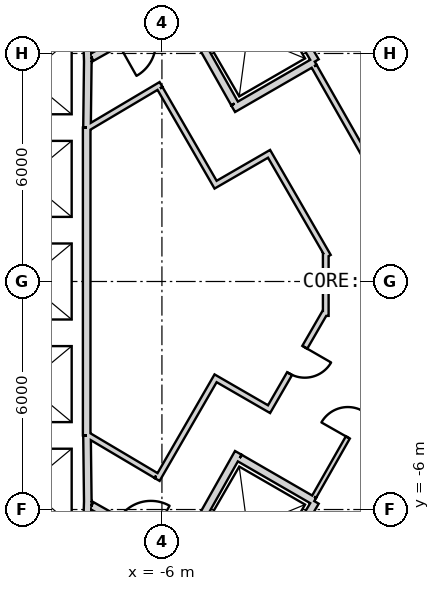
"""IFC4 building model, lengths in metres.
Left out: names, types, materials, properties, quantities, classifications, styles, units other than length and angle.
Written with IfcOpenShell. Run it as: python <this file> out.ifc"""

import sys

from ifc_helpers import new_model, si_unit, direction, frame, frame_2d, origin, place, context, subcontext, project, spatial, rectangle, extrude, element, fill, save


model = new_model("IFC4")
c1 = context("Model", 3, precision=1e-05, world=origin(), true_north=direction((0.0, 1.0)))
c2 = subcontext(c1, "Body", "Model", "MODEL_VIEW")
j1 = project(units=[si_unit("LENGTHUNIT", "METRE"), si_unit("PLANEANGLEUNIT", "RADIAN")], contexts=[c1])
p1 = place(None, origin())
s1 = spatial("IfcSite", under=j1, at=p1, CompositionType="ELEMENT")
p2 = place(p1, origin())
s2 = spatial("IfcBuilding", under=s1, at=p2, CompositionType="ELEMENT")
p3 = place(p2, frame((0.0, 0.0, 156.2)))
s3 = spatial("IfcBuildingStorey", under=s2, at=p3, CompositionType="ELEMENT", Elevation=156.2)
p4 = place(p3, frame((19.475, 2.208, 0.0), z_axis=(0.0, 0.0, 1.0), x_axis=(-0.866028369851, 0.499994862586, 0.0)))
e1 = element("IfcWall", 1, at=p4, inside=s3, PredefinedType="SHEAR", context=c2, shape_type="SweptSolid", body=[
    extrude(rectangle(XDim=31.523, YDim=0.9, at=frame_2d((15.762, 0.0))), origin(), (0.0, 0.0, 1.0), 7.0),
])
p5 = place(p4, frame((7.062, 0.0, 0.0)))
e2 = element("IfcOpeningElement", 2, at=p5, cuts=e1, PredefinedType="OPENING", context=c2, shape_type="SweptSolid", body=[
    extrude(rectangle(XDim=1.2, YDim=2.4, at=frame_2d((0.6, 1.2))), frame((0.0, 0.46, 0.0), z_axis=(0.0, -1.0, 0.0), x_axis=(1.0, 0.0, 0.0)), (0.0, 0.0, 1.0), 0.92),
])
p6 = place(p4, frame((15.162, 0.0, 0.0)))
e3 = element("IfcOpeningElement", 3, at=p6, cuts=e1, PredefinedType="OPENING", context=c2, shape_type="SweptSolid", body=[
    extrude(rectangle(XDim=1.2, YDim=2.4, at=frame_2d((0.6, 1.2))), frame((0.0, 0.46, 0.0), z_axis=(0.0, -1.0, 0.0), x_axis=(1.0, 0.0, 0.0)), (0.0, 0.0, 1.0), 0.92),
])
p7 = place(p4, frame((17.862, 0.0, 0.0)))
e4 = element("IfcOpeningElement", 4, at=p7, cuts=e1, PredefinedType="OPENING", context=c2, shape_type="SweptSolid", body=[
    extrude(rectangle(XDim=1.2, YDim=2.4, at=frame_2d((0.6, 1.2))), frame((0.0, 0.46, 0.0), z_axis=(0.0, -1.0, 0.0), x_axis=(1.0, 0.0, 0.0)), (0.0, 0.0, 1.0), 0.92),
])
p8 = place(p4, frame((20.562, 0.0, 0.0)))
e5 = element("IfcOpeningElement", 5, at=p8, cuts=e1, PredefinedType="OPENING", context=c2, shape_type="SweptSolid", body=[
    extrude(rectangle(XDim=1.2, YDim=2.4, at=frame_2d((0.6, 1.2))), frame((0.0, 0.46, 0.0), z_axis=(0.0, -1.0, 0.0), x_axis=(1.0, 0.0, 0.0)), (0.0, 0.0, 1.0), 0.92),
])
p9 = place(p4, frame((23.262, 0.0, 0.0)))
e6 = element("IfcOpeningElement", 6, at=p9, cuts=e1, PredefinedType="OPENING", context=c2, shape_type="SweptSolid", body=[
    extrude(rectangle(XDim=1.2, YDim=2.4, at=frame_2d((0.6, 1.2))), frame((0.0, 0.46, 0.0), z_axis=(0.0, -1.0, 0.0), x_axis=(1.0, 0.0, 0.0)), (0.0, 0.0, 1.0), 0.92),
])
p10 = place(p4, frame((3.612, 0.0, 0.0)))
e7 = element("IfcOpeningElement", 7, at=p10, cuts=e1, PredefinedType="OPENING", context=c2, shape_type="SweptSolid", body=[
    extrude(rectangle(XDim=1.2, YDim=2.4, at=frame_2d((0.6, 1.2))), frame((0.0, 0.46, 0.0), z_axis=(0.0, -1.0, 0.0), x_axis=(1.0, 0.0, 0.0)), (0.0, 0.0, 1.0), 0.92),
])
p11 = place(p4, frame((26.712, 0.0, 0.0)))
e8 = element("IfcOpeningElement", 8, at=p11, cuts=e1, PredefinedType="OPENING", context=c2, shape_type="SweptSolid", body=[
    extrude(rectangle(XDim=1.2, YDim=2.4, at=frame_2d((0.6, 1.2))), frame((0.0, 0.46, 0.0), z_axis=(0.0, -1.0, 0.0), x_axis=(1.0, 0.0, 0.0)), (0.0, 0.0, 1.0), 0.92),
])
p12 = place(p3, frame((-7.825, -17.97, 0.0), z_axis=(0.0, 0.0, 1.0), x_axis=(0.866028369851, 0.499994862586, 0.0)))
e9 = element("IfcWall", 9, at=p12, inside=s3, PredefinedType="SHEAR", context=c2, shape_type="SweptSolid", body=[
    extrude(rectangle(XDim=31.523, YDim=0.9, at=frame_2d((15.762, 0.0))), origin(), (0.0, 0.0, 1.0), 7.0),
])
p13 = place(p12, frame((7.062, 0.0, 0.0)))
e10 = element("IfcOpeningElement", 10, at=p13, cuts=e9, PredefinedType="OPENING", context=c2, shape_type="SweptSolid", body=[
    extrude(rectangle(XDim=1.2, YDim=2.4, at=frame_2d((0.6, 1.2))), frame((0.0, 0.46, 0.0), z_axis=(0.0, -1.0, 0.0), x_axis=(1.0, 0.0, 0.0)), (0.0, 0.0, 1.0), 0.92),
])
p14 = place(p12, frame((9.762, 0.0, 0.0)))
e11 = element("IfcOpeningElement", 11, at=p14, cuts=e9, PredefinedType="OPENING", context=c2, shape_type="SweptSolid", body=[
    extrude(rectangle(XDim=1.2, YDim=2.4, at=frame_2d((0.6, 1.2))), frame((0.0, 0.46, 0.0), z_axis=(0.0, -1.0, 0.0), x_axis=(1.0, 0.0, 0.0)), (0.0, 0.0, 1.0), 0.92),
])
p15 = place(p12, frame((12.462, 0.0, 0.0)))
e12 = element("IfcOpeningElement", 12, at=p15, cuts=e9, PredefinedType="OPENING", context=c2, shape_type="SweptSolid", body=[
    extrude(rectangle(XDim=1.2, YDim=2.4, at=frame_2d((0.6, 1.2))), frame((0.0, 0.46, 0.0), z_axis=(0.0, -1.0, 0.0), x_axis=(1.0, 0.0, 0.0)), (0.0, 0.0, 1.0), 0.92),
])
p16 = place(p12, frame((15.162, 0.0, 0.0)))
e13 = element("IfcOpeningElement", 13, at=p16, cuts=e9, PredefinedType="OPENING", context=c2, shape_type="SweptSolid", body=[
    extrude(rectangle(XDim=1.2, YDim=2.4, at=frame_2d((0.6, 1.2))), frame((0.0, 0.46, 0.0), z_axis=(0.0, -1.0, 0.0), x_axis=(1.0, 0.0, 0.0)), (0.0, 0.0, 1.0), 0.92),
])
p17 = place(p12, frame((17.862, 0.0, 0.0)))
e14 = element("IfcOpeningElement", 14, at=p17, cuts=e9, PredefinedType="OPENING", context=c2, shape_type="SweptSolid", body=[
    extrude(rectangle(XDim=1.2, YDim=2.4, at=frame_2d((0.6, 1.2))), frame((0.0, 0.46, 0.0), z_axis=(0.0, -1.0, 0.0), x_axis=(1.0, 0.0, 0.0)), (0.0, 0.0, 1.0), 0.92),
])
p18 = place(p12, frame((20.562, 0.0, 0.0)))
e15 = element("IfcOpeningElement", 15, at=p18, cuts=e9, PredefinedType="OPENING", context=c2, shape_type="SweptSolid", body=[
    extrude(rectangle(XDim=1.2, YDim=2.4, at=frame_2d((0.6, 1.2))), frame((0.0, 0.46, 0.0), z_axis=(0.0, -1.0, 0.0), x_axis=(1.0, 0.0, 0.0)), (0.0, 0.0, 1.0), 0.92),
])
p19 = place(p12, frame((26.712, 0.0, 0.0)))
e16 = element("IfcOpeningElement", 16, at=p19, cuts=e9, PredefinedType="OPENING", context=c2, shape_type="SweptSolid", body=[
    extrude(rectangle(XDim=1.2, YDim=2.4, at=frame_2d((0.6, 1.2))), frame((0.0, 0.46, 0.0), z_axis=(0.0, -1.0, 0.0), x_axis=(1.0, 0.0, 0.0)), (0.0, 0.0, 1.0), 0.92),
])
p20 = place(p12, frame((3.612, 0.0, 0.0)))
e17 = element("IfcOpeningElement", 17, at=p20, cuts=e9, PredefinedType="OPENING", context=c2, shape_type="SweptSolid", body=[
    extrude(rectangle(XDim=1.2, YDim=2.4, at=frame_2d((0.6, 1.2))), frame((0.0, 0.46, 0.0), z_axis=(0.0, -1.0, 0.0), x_axis=(1.0, 0.0, 0.0)), (0.0, 0.0, 1.0), 0.92),
])
p21 = place(p3, frame((-7.977, 6.65, 0.0), z_axis=(0.0, 0.0, 1.0), x_axis=(0.030861509705, -0.999523670164, 0.0)))
e18 = element("IfcWall", 18, at=p21, inside=s3, PredefinedType="PLUMBINGWALL", context=c2, shape_type="SweptSolid", body=[
    extrude(rectangle(XDim=0.878, YDim=0.2, at=frame_2d((0.439, 0.0))), origin(), (0.0, 0.0, 1.0), 6.65),
])
p22 = place(p3, frame((-7.949, 5.895, 0.0), z_axis=(0.0, 0.0, 1.0), x_axis=(-0.012042535896, -0.999927486035, 0.0)))
e19 = element("IfcWall", 19, at=p22, inside=s3, PredefinedType="PLUMBINGWALL", context=c2, shape_type="SweptSolid", body=[
    extrude(rectangle(XDim=1.845, YDim=0.2, at=frame_2d((0.922, 0.0))), origin(), (0.0, 0.0, 1.0), 6.65),
])
p23 = place(p3, frame((-7.98, 4.05, 0.0), z_axis=(0.0, 0.0, 1.0), x_axis=(0.0, -1.0, 0.0)))
e20 = element("IfcWall", 20, at=p23, inside=s3, PredefinedType="PLUMBINGWALL", context=c2, shape_type="SweptSolid", body=[
    extrude(rectangle(XDim=8.1, YDim=0.2, at=frame_2d((4.05, 0.0))), origin(), (0.0, 0.0, 1.0), 6.65),
])
p24 = place(p3, frame((-7.95, -5.772, 0.0), z_axis=(0.0, 0.0, 1.0), x_axis=(-0.030803413295, -0.999525462272, 0.0)))
e21 = element("IfcWall", 21, at=p24, inside=s3, PredefinedType="PLUMBINGWALL", context=c2, shape_type="SweptSolid", body=[
    extrude(rectangle(XDim=1.078, YDim=0.2, at=frame_2d((0.539, 0.0))), origin(), (0.0, 0.0, 1.0), 6.65),
])
p25 = place(p3, frame((-7.971, -4.05, 0.0), z_axis=(0.0, 0.0, 1.0), x_axis=(0.012042535896, -0.999927486035, 0.0)))
e22 = element("IfcWall", 22, at=p25, inside=s3, PredefinedType="PLUMBINGWALL", context=c2, shape_type="SweptSolid", body=[
    extrude(rectangle(XDim=1.845, YDim=0.2, at=frame_2d((0.922, 0.0))), origin(), (0.0, 0.0, 1.0), 6.65),
])
p26 = place(p3, frame((-3.538, 8.465, 0.0), z_axis=(0.0, 0.0, 1.0), x_axis=(0.508647062354, -0.860975125052, 0.0)))
e23 = element("IfcWall", 23, at=p26, inside=s3, PredefinedType="PLUMBINGWALL", context=c2, shape_type="SweptSolid", body=[
    extrude(rectangle(XDim=3.1, YDim=0.2, at=frame_2d((1.55, 0.0))), origin(), (0.0, 0.0, 1.0), 6.65),
])
p27 = place(p3, frame((-1.979, 5.786, 0.0), z_axis=(0.0, 0.0, 1.0), x_axis=(-0.866016689309, -0.500015093611, 0.0)))
e24 = element("IfcWall", 24, at=p27, inside=s3, PredefinedType="PLUMBINGWALL", context=c2, shape_type="SweptSolid", body=[
    extrude(rectangle(XDim=2.479, YDim=0.2, at=frame_2d((1.24, 0.0))), origin(), (0.0, 0.0, 1.0), 6.65),
])
p28 = place(p3, frame((-5.562, 7.296, 0.0), z_axis=(0.0, 0.0, 1.0), x_axis=(0.49134651263, -0.870964180966, 0.0)))
e25 = element("IfcWall", 25, at=p28, inside=s3, PredefinedType="PLUMBINGWALL", context=c2, shape_type="SweptSolid", body=[
    extrude(rectangle(XDim=3.0, YDim=0.2, at=frame_2d((1.5, 0.0))), origin(), (0.0, 0.0, 1.0), 6.65),
])
p29 = place(p3, frame((-1.961, -5.796, 0.0), z_axis=(0.0, 0.0, 1.0), x_axis=(-0.508647062354, -0.860975125052, 0.0)))
e26 = element("IfcWall", 26, at=p29, inside=s3, PredefinedType="PLUMBINGWALL", context=c2, shape_type="SweptSolid", body=[
    extrude(rectangle(XDim=3.1, YDim=0.2, at=frame_2d((1.55, 0.0))), origin(), (0.0, 0.0, 1.0), 6.65),
])
p30 = place(p3, frame((-3.99, -4.509, 0.0), z_axis=(0.0, 0.0, 1.0), x_axis=(-0.491358283181, -0.870957540612, 0.0)))
e27 = element("IfcWall", 27, at=p30, inside=s3, PredefinedType="PLUMBINGWALL", context=c2, shape_type="SweptSolid", body=[
    extrude(rectangle(XDim=3.2, YDim=0.2, at=frame_2d((1.6, 0.0))), origin(), (0.0, 0.0, 1.0), 6.65),
])
p31 = place(p3, frame((-3.953, -4.646, 0.0), z_axis=(0.0, 0.0, 1.0), x_axis=(0.866065302921, -0.4999308863, 0.0)))
e28 = element("IfcWall", 28, at=p31, inside=s3, PredefinedType="PLUMBINGWALL", context=c2, shape_type="SweptSolid", body=[
    extrude(rectangle(XDim=2.264, YDim=0.2, at=frame_2d((1.132, 0.0))), origin(), (0.0, 0.0, 1.0), 6.65),
])
p32 = place(p3, frame((-5.6, 7.16, 0.0), z_axis=(0.0, 0.0, 1.0), x_axis=(-0.871363259478, -0.490638431059, 0.0)))
e29 = element("IfcWall", 29, at=p32, inside=s3, PredefinedType="PARTITIONING", context=c2, shape_type="SweptSolid", body=[
    extrude(rectangle(XDim=2.581, YDim=0.2, at=frame_2d((1.291, 0.0))), origin(), (0.0, 0.0, 1.0), 6.65),
])
p33 = place(p32, frame((0.791, 0.0, 0.0)))
e30 = element("IfcOpeningElement", 30, at=p33, cuts=e29, PredefinedType="OPENING", context=c2, shape_type="SweptSolid", body=[
    extrude(rectangle(XDim=1.0, YDim=2.1, at=frame_2d((0.5, 1.05))), frame((0.0, 0.11, 0.0), z_axis=(0.0, -1.0, 0.0), x_axis=(1.0, 0.0, 0.0)), (0.0, 0.0, 1.0), 0.22),
])
p34 = place(p3, frame((-7.849, -5.894, 0.0), z_axis=(0.0, 0.0, 1.0), x_axis=(0.871363259478, -0.490638431059, 0.0)))
e31 = element("IfcWall", 31, at=p34, inside=s3, PredefinedType="PARTITIONING", context=c2, shape_type="SweptSolid", body=[
    extrude(rectangle(XDim=2.581, YDim=0.2, at=frame_2d((1.291, 0.0))), origin(), (0.0, 0.0, 1.0), 6.65),
])
p35 = place(p34, frame((0.791, 0.0, 0.0)))
e32 = element("IfcOpeningElement", 32, at=p35, cuts=e31, PredefinedType="OPENING", context=c2, shape_type="SweptSolid", body=[
    extrude(rectangle(XDim=1.0, YDim=2.1, at=frame_2d((0.5, 1.05))), frame((0.0, 0.11, 0.0), z_axis=(0.0, -1.0, 0.0), x_axis=(1.0, 0.0, 0.0)), (0.0, 0.0, 1.0), 0.22),
])
p36 = place(p3, frame((-1.994, 5.661, 0.0), z_axis=(0.0, 0.0, 1.0), x_axis=(0.494341211302, -0.869267948798, 0.0)))
e33 = element("IfcWall", 33, at=p36, inside=s3, PredefinedType="PLUMBINGWALL", context=c2, shape_type="SweptSolid", body=[
    extrude(rectangle(XDim=4.361, YDim=0.15, at=frame_2d((2.18, 0.0))), origin(), (0.0, 0.0, 1.0), 6.65),
])
p37 = place(p3, frame((0.224, -1.761, 0.0), z_axis=(0.0, 0.0, 1.0), x_axis=(-0.494327216836, -0.869275907118, 0.0)))
e34 = element("IfcWall", 34, at=p37, inside=s3, PredefinedType="PARTITIONING", context=c2, shape_type="SweptSolid", body=[
    extrude(rectangle(XDim=4.487, YDim=0.12, at=frame_2d((2.244, 0.0))), origin(), (0.0, 0.0, 1.0), 6.65),
])
p38 = place(p37, frame((1.895, 0.0, 0.0)))
e35 = element("IfcOpeningElement", 35, at=p38, cuts=e34, PredefinedType="OPENING", context=c2, shape_type="SweptSolid", body=[
    extrude(rectangle(XDim=0.8, YDim=2.1, at=frame_2d((0.4, 1.05))), frame((0.0, 0.07, 0.0), z_axis=(0.0, -1.0, 0.0), x_axis=(1.0, 0.0, 0.0)), (0.0, 0.0, 1.0), 0.14),
])
p39 = place(p3, frame((-6.024, 5.183, 0.0), z_axis=(0.0, 0.0, 1.0), x_axis=(-0.860126804455, -0.510080268447, 0.0)))
e36 = element("IfcWall", 36, at=p39, inside=s3, PredefinedType="PLUMBINGWALL", context=c2, shape_type="SweptSolid", body=[
    extrude(rectangle(XDim=2.24, YDim=0.15, at=frame_2d((1.12, 0.0))), origin(), (0.0, 0.0, 1.0), 6.65),
])
p40 = place(p3, frame((-4.551, 2.482, 0.0), z_axis=(0.0, 0.0, 1.0), x_axis=(-0.499990139034, 0.866031096941, 0.0)))
e37 = element("IfcWall", 37, at=p40, inside=s3, PredefinedType="PLUMBINGWALL", context=c2, shape_type="SweptSolid", body=[
    extrude(rectangle(XDim=3.0, YDim=0.15, at=frame_2d((1.5, 0.0))), origin(), (0.0, 0.0, 1.0), 6.65),
])
p41 = place(p3, frame((-3.116, 3.397, 0.0), z_axis=(0.0, 0.0, 1.0), x_axis=(-0.866053003207, -0.499952193351, 0.0)))
e38 = element("IfcWall", 38, at=p41, inside=s3, PredefinedType="PLUMBINGWALL", context=c2, shape_type="SweptSolid", body=[
    extrude(rectangle(XDim=1.625, YDim=0.15, at=frame_2d((0.812, 0.0))), origin(), (0.0, 0.0, 1.0), 6.65),
])
p42 = place(p3, frame((-1.624, 0.663, 0.0), z_axis=(0.0, 0.0, 1.0), x_axis=(-0.500035348339, 0.866004994449, 0.0)))
e39 = element("IfcWall", 39, at=p42, inside=s3, PredefinedType="PLUMBINGWALL", context=c2, shape_type="SweptSolid", body=[
    extrude(rectangle(XDim=3.039, YDim=0.15, at=frame_2d((1.52, 0.0))), origin(), (0.0, 0.0, 1.0), 6.65),
])
p43 = place(p3, frame((-1.689, -0.905, 0.0), z_axis=(0.0, 0.0, 1.0), x_axis=(0.0, 1.0, 0.0)))
e40 = element("IfcWall", 40, at=p43, inside=s3, PredefinedType="PLUMBINGWALL", context=c2, shape_type="SweptSolid", body=[
    extrude(rectangle(XDim=1.656, YDim=0.15, at=frame_2d((0.828, 0.0))), origin(), (0.0, 0.0, 1.0), 6.65),
])
p44 = place(p3, frame((-3.219, -3.425, 0.0), z_axis=(0.0, 0.0, 1.0), x_axis=(0.499996236806, 0.866027576455, 0.0)))
e41 = element("IfcWall", 41, at=p44, inside=s3, PredefinedType="PLUMBINGWALL", context=c2, shape_type="SweptSolid", body=[
    extrude(rectangle(XDim=3.036, YDim=0.15, at=frame_2d((1.518, 0.0))), origin(), (0.0, 0.0, 1.0), 6.65),
])
p45 = place(p44, frame((1.156, 0.0, 0.0)))
e42 = element("IfcOpeningElement", 42, at=p45, cuts=e41, PredefinedType="OPENING", context=c2, shape_type="SweptSolid", body=[
    extrude(rectangle(XDim=0.8, YDim=2.1, at=frame_2d((0.4, 1.05))), frame((0.0, 0.085, 0.0), z_axis=(0.0, -1.0, 0.0), x_axis=(1.0, 0.0, 0.0)), (0.0, 0.0, 1.0), 0.17),
])
p46 = place(p3, frame((-4.653, -2.51, 0.0), z_axis=(0.0, 0.0, 1.0), x_axis=(0.866053003207, -0.499952193351, 0.0)))
e43 = element("IfcWall", 43, at=p46, inside=s3, PredefinedType="PLUMBINGWALL", context=c2, shape_type="SweptSolid", body=[
    extrude(rectangle(XDim=1.625, YDim=0.15, at=frame_2d((0.812, 0.0))), origin(), (0.0, 0.0, 1.0), 6.65),
])
p47 = place(p3, frame((-6.126, -5.21, 0.0), z_axis=(0.0, 0.0, 1.0), x_axis=(0.499990139034, 0.866031096941, 0.0)))
e44 = element("IfcWall", 44, at=p47, inside=s3, PredefinedType="PLUMBINGWALL", context=c2, shape_type="SweptSolid", body=[
    extrude(rectangle(XDim=3.0, YDim=0.15, at=frame_2d((1.5, 0.0))), origin(), (0.0, 0.0, 1.0), 6.65),
])
p48 = place(p3, frame((-7.95, -4.041, 0.0), z_axis=(0.0, 0.0, 1.0), x_axis=(0.860090281069, -0.510141851263, 0.0)))
e45 = element("IfcWall", 45, at=p48, inside=s3, PredefinedType="PLUMBINGWALL", context=c2, shape_type="SweptSolid", body=[
    extrude(rectangle(XDim=2.089, YDim=0.15, at=frame_2d((1.045, 0.0))), origin(), (0.0, 0.0, 1.0), 6.65),
])
p49 = place(p38, origin())
e46 = element("IfcDoor", 46, at=p49, inside=s3, OperationType="SINGLE_SWING_RIGHT", PredefinedType="USERDEFINED", context=c2, shape_type="SweptSolid", body=[
    extrude(rectangle(XDim=0.8, YDim=2.1, at=frame_2d((0.4, 1.05))), frame((0.0, 0.025, 0.0), z_axis=(0.0, -1.0, 0.0), x_axis=(1.0, 0.0, 0.0)), (0.0, 0.0, 1.0), 0.05),
])
fill(e35, e46)
p50 = place(p45, origin())
e47 = element("IfcDoor", 47, at=p50, inside=s3, OperationType="SINGLE_SWING_RIGHT", PredefinedType="USERDEFINED", context=c2, shape_type="SweptSolid", body=[
    extrude(rectangle(XDim=0.8, YDim=2.1, at=frame_2d((0.4, 1.05))), frame((0.0, 0.025, 0.0), z_axis=(0.0, -1.0, 0.0), x_axis=(1.0, 0.0, 0.0)), (0.0, 0.0, 1.0), 0.05),
])
fill(e42, e47)
save(model, sys.argv[1])
